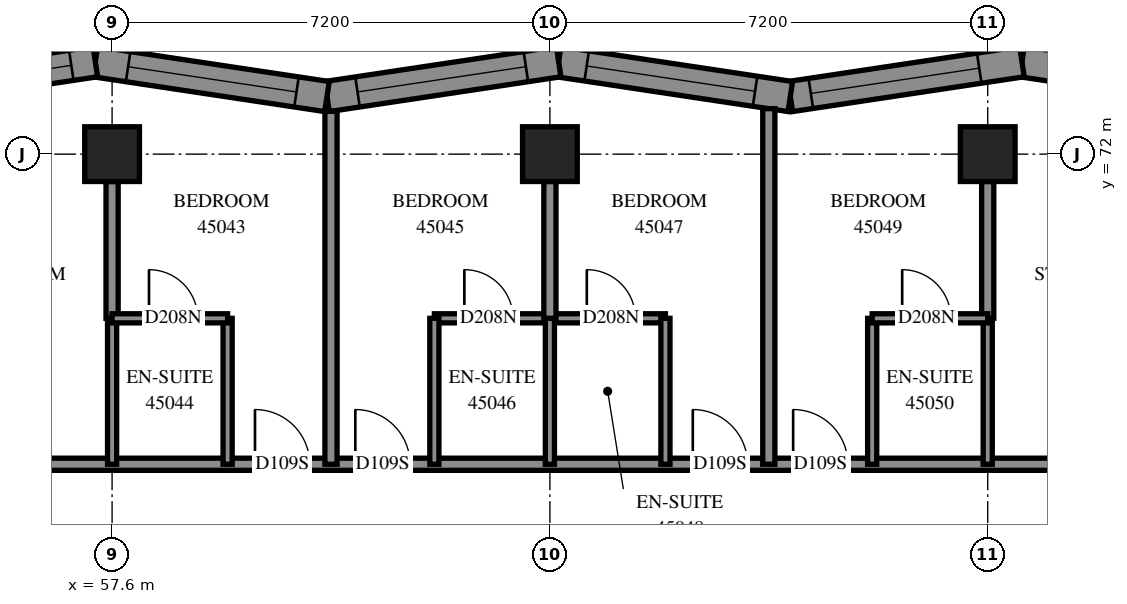
"""IFC4 building model, lengths in metres.
Left out: names, types, materials, properties, quantities, classifications, styles, units other than length and angle.
Written with IfcOpenShell. Run it as: python <this file> out.ifc"""

import sys

from ifc_helpers import new_model, si_unit, direction, frame, frame_2d, origin, origin_2d, place, context, subcontext, project, spatial, polyline, rectangle, outline, extrude, element, fill, save


model = new_model("IFC4")
c1 = context("Model", 3, precision=1e-05, world=origin(), true_north=direction((0.0, 1.0)))
c2 = subcontext(c1, "Body", "Model", "MODEL_VIEW")
j1 = project(units=[si_unit("LENGTHUNIT", "METRE"), si_unit("PLANEANGLEUNIT", "RADIAN")], contexts=[c1])
p1 = place(None, origin())
s1 = spatial("IfcSite", under=j1, at=p1, CompositionType="ELEMENT")
p2 = place(p1, origin())
s2 = spatial("IfcBuilding", under=s1, at=p2, CompositionType="ELEMENT")
p3 = place(p2, frame((0.0, 0.0, 166.0)))
s3 = spatial("IfcBuildingStorey", under=s2, at=p3, CompositionType="ELEMENT", Elevation=166.0)
for number, where, z_axis, x_axis in (
    (1, (57.6, 72.0, 0.0), (0.0, 0.0, 1.0), (1.0, 0.0, 0.0)),
    (2, (64.8, 72.0, 0.0), (0.0, 0.0, 1.0), (1.0, 0.0, 0.0)),
    (3, (72.0, 72.0, 0.0), (0.0, 0.0, 1.0), (1.0, 0.0, 0.0)),
):
    element("IfcColumn", number, at=place(p3, frame(where, z_axis=z_axis, x_axis=x_axis)), inside=s3, PredefinedType="COLUMN", context=c2, shape_type="SweptSolid", body=[
        extrude(rectangle(XDim=0.9, YDim=0.9, at=origin_2d()), origin(), (0.0, 0.0, 1.0), 3.1),
    ])
p4 = place(p3, frame((76.392, 72.944, 0.0), z_axis=(0.0, 0.0, 1.0), x_axis=(-0.9889143658, 0.1484869591, 0.0)))
e4 = element("IfcWall", 4, at=p4, inside=s3, PredefinedType="SOLIDWALL", context=c2, shape_type="SweptSolid", body=[
    extrude(outline(polyline([(0.057, -0.25), (3.909, -0.25), (3.834, 0.25), (-0.057, 0.25), (0.057, -0.25)])), origin(), (0.0, 0.0, 1.0), 3.1),
])
p5 = place(p4, frame((1.617, 0.0, 0.45)))
e5 = element("IfcOpeningElement", 5, at=p5, cuts=e4, PredefinedType="OPENING", context=c2, shape_type="SweptSolid", body=[
    extrude(rectangle(XDim=1.2, YDim=2.5, at=frame_2d((0.6, 1.25))), frame((0.0, 0.26, 0.0), z_axis=(0.0, -1.0, 0.0), x_axis=(1.0, 0.0, 0.0)), (0.0, 0.0, 1.0), 0.52),
])
p6 = place(p3, frame((72.563, 73.519, 0.0), z_axis=(0.0, 0.0, 1.0), x_axis=(-0.9889150173, -0.1484826202, 0.0)))
e6 = element("IfcWall", 6, at=p6, inside=s3, PredefinedType="SOLIDWALL", context=c2, shape_type="SweptSolid", body=[
    extrude(outline(polyline([(-0.037, -0.25), (3.815, -0.25), (3.89, 0.25), (0.037, 0.25), (-0.037, -0.25)])), origin(), (0.0, 0.0, 1.0), 3.1),
])
p7 = place(p6, frame((0.711, 0.0, 0.45)))
e7 = element("IfcOpeningElement", 7, at=p7, cuts=e6, PredefinedType="OPENING", context=c2, shape_type="SweptSolid", body=[
    extrude(rectangle(XDim=2.8, YDim=2.5, at=frame_2d((1.4, 1.25))), frame((0.0, 0.26, 0.0), z_axis=(0.0, -1.0, 0.0), x_axis=(1.0, 0.0, 0.0)), (0.0, 0.0, 1.0), 0.52),
])
p8 = place(p3, frame((68.754, 72.947, 0.0), z_axis=(0.0, 0.0, 1.0), x_axis=(-0.9889155896, 0.1484788086, 0.0)))
e8 = element("IfcWall", 8, at=p8, inside=s3, PredefinedType="SOLIDWALL", context=c2, shape_type="SweptSolid", body=[
    extrude(outline(polyline([(0.037, -0.25), (3.89, -0.25), (3.815, 0.25), (-0.037, 0.25), (0.037, -0.25)])), origin(), (0.0, 0.0, 1.0), 3.1),
])
p9 = place(p8, frame((0.586, 0.0, 0.45)))
e9 = element("IfcOpeningElement", 9, at=p9, cuts=e8, PredefinedType="OPENING", context=c2, shape_type="SweptSolid", body=[
    extrude(rectangle(XDim=2.8, YDim=2.5, at=frame_2d((1.4, 1.25))), frame((0.0, 0.26, 0.0), z_axis=(0.0, -1.0, 0.0), x_axis=(1.0, 0.0, 0.0)), (0.0, 0.0, 1.0), 0.52),
])
p10 = place(p3, frame((64.944, 73.519, 0.0), z_axis=(0.0, 0.0, 1.0), x_axis=(-0.9889150173, -0.1484826202, 0.0)))
e10 = element("IfcWall", 10, at=p10, inside=s3, PredefinedType="SOLIDWALL", context=c2, shape_type="SweptSolid", body=[
    extrude(outline(polyline([(-0.037, -0.25), (3.815, -0.25), (3.89, 0.25), (0.037, 0.25), (-0.037, -0.25)])), origin(), (0.0, 0.0, 1.0), 3.1),
])
p11 = place(p10, frame((0.545, 0.0, 0.45)))
e11 = element("IfcOpeningElement", 11, at=p11, cuts=e10, PredefinedType="OPENING", context=c2, shape_type="SweptSolid", body=[
    extrude(rectangle(XDim=2.8, YDim=2.5, at=frame_2d((1.4, 1.25))), frame((0.0, 0.26, 0.0), z_axis=(0.0, -1.0, 0.0), x_axis=(1.0, 0.0, 0.0)), (0.0, 0.0, 1.0), 0.52),
])
p12 = place(p3, frame((61.134, 72.947, 0.0), z_axis=(0.0, 0.0, 1.0), x_axis=(-0.9889155896, 0.1484788086, 0.0)))
e12 = element("IfcWall", 12, at=p12, inside=s3, PredefinedType="SOLIDWALL", context=c2, shape_type="SweptSolid", body=[
    extrude(outline(polyline([(0.037, -0.25), (3.89, -0.25), (3.815, 0.25), (-0.037, 0.25), (0.037, -0.25)])), origin(), (0.0, 0.0, 1.0), 3.1),
])
p13 = place(p12, frame((0.507, 0.0, 0.45)))
e13 = element("IfcOpeningElement", 13, at=p13, cuts=e12, PredefinedType="OPENING", context=c2, shape_type="SweptSolid", body=[
    extrude(rectangle(XDim=2.8, YDim=2.5, at=frame_2d((1.4, 1.25))), frame((0.0, 0.26, 0.0), z_axis=(0.0, -1.0, 0.0), x_axis=(1.0, 0.0, 0.0)), (0.0, 0.0, 1.0), 0.52),
])
p14 = place(p3, frame((57.325, 73.519, 0.0), z_axis=(0.0, 0.0, 1.0), x_axis=(-0.9889155896, -0.1484788086, 0.0)))
e14 = element("IfcWall", 14, at=p14, inside=s3, PredefinedType="SOLIDWALL", context=c2, shape_type="SweptSolid", body=[
    extrude(outline(polyline([(-0.037, -0.25), (3.815, -0.25), (3.89, 0.25), (0.037, 0.25), (-0.037, -0.25)])), origin(), (0.0, 0.0, 1.0), 3.1),
])
p15 = place(p14, frame((0.4, 0.0, 0.45)))
e15 = element("IfcOpeningElement", 15, at=p15, cuts=e14, PredefinedType="OPENING", context=c2, shape_type="SweptSolid", body=[
    extrude(rectangle(XDim=2.8, YDim=2.5, at=frame_2d((1.4, 1.25))), frame((0.0, 0.26, 0.0), z_axis=(0.0, -1.0, 0.0), x_axis=(1.0, 0.0, 0.0)), (0.0, 0.0, 1.0), 0.52),
])
p16 = place(p3, frame((55.5, 66.9, 0.0), z_axis=(0.0, 0.0, 1.0), x_axis=(1.0, 0.0, 0.0)))
e16 = element("IfcWall", 16, at=p16, inside=s3, PredefinedType="PARTITIONING", context=c2, shape_type="SweptSolid", body=[
    extrude(rectangle(XDim=18.6, YDim=0.2, at=frame_2d((9.3, 0.0))), origin(), (0.0, 0.0, 1.0), 3.1),
])
p17 = place(p16, frame((4.45, 0.0, 0.0)))
e17 = element("IfcOpeningElement", 17, at=p17, cuts=e16, PredefinedType="OPENING", context=c2, shape_type="SweptSolid", body=[
    extrude(rectangle(XDim=0.9, YDim=2.1, at=frame_2d((0.45, 1.05))), frame((0.0, 0.11, 0.0), z_axis=(0.0, -1.0, 0.0), x_axis=(1.0, 0.0, 0.0)), (0.0, 0.0, 1.0), 0.22),
])
p18 = place(p16, frame((6.1, 0.0, 0.0)))
e18 = element("IfcOpeningElement", 18, at=p18, cuts=e16, PredefinedType="OPENING", context=c2, shape_type="SweptSolid", body=[
    extrude(rectangle(XDim=0.9, YDim=2.1, at=frame_2d((0.45, 1.05))), frame((0.0, 0.11, 0.0), z_axis=(0.0, -1.0, 0.0), x_axis=(1.0, 0.0, 0.0)), (0.0, 0.0, 1.0), 0.22),
])
p19 = place(p16, frame((11.65, 0.0, 0.0)))
e19 = element("IfcOpeningElement", 19, at=p19, cuts=e16, PredefinedType="OPENING", context=c2, shape_type="SweptSolid", body=[
    extrude(rectangle(XDim=0.9, YDim=2.1, at=frame_2d((0.45, 1.05))), frame((0.0, 0.11, 0.0), z_axis=(0.0, -1.0, 0.0), x_axis=(1.0, 0.0, 0.0)), (0.0, 0.0, 1.0), 0.22),
])
p20 = place(p16, frame((13.3, 0.0, 0.0)))
e20 = element("IfcOpeningElement", 20, at=p20, cuts=e16, PredefinedType="OPENING", context=c2, shape_type="SweptSolid", body=[
    extrude(rectangle(XDim=0.9, YDim=2.1, at=frame_2d((0.45, 1.05))), frame((0.0, 0.11, 0.0), z_axis=(0.0, -1.0, 0.0), x_axis=(1.0, 0.0, 0.0)), (0.0, 0.0, 1.0), 0.22),
])
p21 = place(p3, frame((68.4, 66.9, 0.0), z_axis=(0.0, 0.0, 1.0), x_axis=(0.0, 1.0, 0.0)))
e21 = element("IfcWall", 21, at=p21, inside=s3, PredefinedType="PARTITIONING", context=c2, shape_type="SweptSolid", body=[
    extrude(rectangle(XDim=5.848, YDim=0.2, at=frame_2d((2.924, 0.0))), origin(), (0.0, 0.0, 1.0), 3.1),
])
p22 = place(p3, frame((61.2, 66.9, 0.0), z_axis=(0.0, 0.0, 1.0), x_axis=(0.0, 1.0, 0.0)))
e22 = element("IfcWall", 22, at=p22, inside=s3, PredefinedType="PARTITIONING", context=c2, shape_type="SweptSolid", body=[
    extrude(rectangle(XDim=5.804, YDim=0.2, at=frame_2d((2.902, 0.0))), origin(), (0.0, 0.0, 1.0), 3.1),
])
p23 = place(p3, frame((62.9, 69.3, 0.0), z_axis=(0.0, 0.0, 1.0), x_axis=(1.0, 0.0, 0.0)))
e23 = element("IfcWall", 23, at=p23, inside=s3, PredefinedType="PARTITIONING", context=c2, shape_type="SweptSolid", body=[
    extrude(rectangle(XDim=3.8, YDim=0.15, at=frame_2d((1.9, 0.0))), origin(), (0.0, 0.0, 1.0), 3.1),
])
p24 = place(p23, frame((0.493, 0.0, 0.0)))
e24 = element("IfcOpeningElement", 24, at=p24, cuts=e23, PredefinedType="OPENING", context=c2, shape_type="SweptSolid", body=[
    extrude(rectangle(XDim=0.8, YDim=2.1, at=frame_2d((0.4, 1.05))), frame((0.0, 0.085, 0.0), z_axis=(0.0, -1.0, 0.0), x_axis=(1.0, 0.0, 0.0)), (0.0, 0.0, 1.0), 0.17),
])
p25 = place(p23, frame((2.507, 0.0, 0.0)))
e25 = element("IfcOpeningElement", 25, at=p25, cuts=e23, PredefinedType="OPENING", context=c2, shape_type="SweptSolid", body=[
    extrude(rectangle(XDim=0.8, YDim=2.1, at=frame_2d((0.4, 1.05))), frame((0.0, 0.085, 0.0), z_axis=(0.0, -1.0, 0.0), x_axis=(1.0, 0.0, 0.0)), (0.0, 0.0, 1.0), 0.17),
])
for number, where, z_axis, x_axis in (
    (26, (57.6, 66.9, 0.0), (0.0, 0.0, 1.0), (0.0, 1.0, 0.0)),
    (27, (59.5, 66.9, 0.0), (0.0, 0.0, 1.0), (0.0, 1.0, 0.0)),
    (28, (62.9, 66.9, 0.0), (0.0, 0.0, 1.0), (0.0, 1.0, 0.0)),
    (29, (64.8, 66.9, 0.0), (0.0, 0.0, 1.0), (0.0, 1.0, 0.0)),
    (30, (66.7, 66.9, 0.0), (0.0, 0.0, 1.0), (0.0, 1.0, 0.0)),
    (31, (70.1, 66.9, 0.0), (0.0, 0.0, 1.0), (0.0, 1.0, 0.0)),
    (32, (72.0, 66.9, 0.0), (0.0, 0.0, 1.0), (0.0, 1.0, 0.0)),
):
    element("IfcWall", number, at=place(p3, frame(where, z_axis=z_axis, x_axis=x_axis)), inside=s3, PredefinedType="PARTITIONING", context=c2, shape_type="SweptSolid", body=[
        extrude(rectangle(XDim=2.4, YDim=0.15, at=frame_2d((1.2, 0.0))), origin(), (0.0, 0.0, 1.0), 3.1),
    ])
for number, where, z_axis, x_axis in (
    (33, (57.6, 69.3, 0.0), (0.0, 0.0, 1.0), (0.0, 1.0, 0.0)),
    (34, (64.8, 69.3, 0.0), (0.0, 0.0, 1.0), (0.0, 1.0, 0.0)),
    (35, (72.0, 69.3, 0.0), (0.0, 0.0, 1.0), (0.0, 1.0, 0.0)),
):
    element("IfcWall", number, at=place(p3, frame(where, z_axis=z_axis, x_axis=x_axis)), inside=s3, PredefinedType="PARTITIONING", context=c2, shape_type="SweptSolid", body=[
        extrude(rectangle(XDim=2.25, YDim=0.2, at=frame_2d((1.125, 0.0))), origin(), (0.0, 0.0, 1.0), 3.1),
    ])
p26 = place(p3, frame((70.1, 69.3, 0.0), z_axis=(0.0, 0.0, 1.0), x_axis=(1.0, 0.0, 0.0)))
e36 = element("IfcWall", 36, at=p26, inside=s3, PredefinedType="PARTITIONING", context=c2, shape_type="SweptSolid", body=[
    extrude(rectangle(XDim=1.9, YDim=0.15, at=frame_2d((0.95, 0.0))), origin(), (0.0, 0.0, 1.0), 3.1),
])
p27 = place(p26, frame((0.493, 0.0, 0.0)))
e37 = element("IfcOpeningElement", 37, at=p27, cuts=e36, PredefinedType="OPENING", context=c2, shape_type="SweptSolid", body=[
    extrude(rectangle(XDim=0.8, YDim=2.1, at=frame_2d((0.4, 1.05))), frame((0.0, 0.085, 0.0), z_axis=(0.0, -1.0, 0.0), x_axis=(1.0, 0.0, 0.0)), (0.0, 0.0, 1.0), 0.17),
])
p28 = place(p3, frame((57.6, 69.3, 0.0), z_axis=(0.0, 0.0, 1.0), x_axis=(1.0, 0.0, 0.0)))
e38 = element("IfcWall", 38, at=p28, inside=s3, PredefinedType="PARTITIONING", context=c2, shape_type="SweptSolid", body=[
    extrude(rectangle(XDim=1.9, YDim=0.15, at=frame_2d((0.95, 0.0))), origin(), (0.0, 0.0, 1.0), 3.1),
])
p29 = place(p28, frame((0.607, 0.0, 0.0)))
e39 = element("IfcOpeningElement", 39, at=p29, cuts=e38, PredefinedType="OPENING", context=c2, shape_type="SweptSolid", body=[
    extrude(rectangle(XDim=0.8, YDim=2.1, at=frame_2d((0.4, 1.05))), frame((0.0, 0.085, 0.0), z_axis=(0.0, -1.0, 0.0), x_axis=(1.0, 0.0, 0.0)), (0.0, 0.0, 1.0), 0.17),
])
p30 = place(p7, origin())
e40 = element("IfcWindow", 40, at=p30, inside=s3, PartitioningType="SINGLE_PANEL", PredefinedType="WINDOW", context=c2, shape_type="SweptSolid", body=[
    extrude(rectangle(XDim=2.8, YDim=2.5, at=frame_2d((1.4, 1.25))), frame((0.0, 0.18, 0.0), z_axis=(0.0, -1.0, 0.0), x_axis=(1.0, 0.0, 0.0)), (0.0, 0.0, 1.0), 0.06),
])
fill(e7, e40)
p31 = place(p9, origin())
e41 = element("IfcWindow", 41, at=p31, inside=s3, PartitioningType="SINGLE_PANEL", PredefinedType="WINDOW", context=c2, shape_type="SweptSolid", body=[
    extrude(rectangle(XDim=2.8, YDim=2.5, at=frame_2d((1.4, 1.25))), frame((0.0, 0.18, 0.0), z_axis=(0.0, -1.0, 0.0), x_axis=(1.0, 0.0, 0.0)), (0.0, 0.0, 1.0), 0.06),
])
fill(e9, e41)
p32 = place(p11, origin())
e42 = element("IfcWindow", 42, at=p32, inside=s3, PartitioningType="SINGLE_PANEL", PredefinedType="WINDOW", context=c2, shape_type="SweptSolid", body=[
    extrude(rectangle(XDim=2.8, YDim=2.5, at=frame_2d((1.4, 1.25))), frame((0.0, 0.18, 0.0), z_axis=(0.0, -1.0, 0.0), x_axis=(1.0, 0.0, 0.0)), (0.0, 0.0, 1.0), 0.06),
])
fill(e11, e42)
p33 = place(p13, origin())
e43 = element("IfcWindow", 43, at=p33, inside=s3, PartitioningType="SINGLE_PANEL", PredefinedType="WINDOW", context=c2, shape_type="SweptSolid", body=[
    extrude(rectangle(XDim=2.8, YDim=2.5, at=frame_2d((1.4, 1.25))), frame((0.0, 0.18, 0.0), z_axis=(0.0, -1.0, 0.0), x_axis=(1.0, 0.0, 0.0)), (0.0, 0.0, 1.0), 0.06),
])
fill(e13, e43)
p34 = place(p15, origin())
e44 = element("IfcWindow", 44, at=p34, inside=s3, PartitioningType="SINGLE_PANEL", PredefinedType="WINDOW", context=c2, shape_type="SweptSolid", body=[
    extrude(rectangle(XDim=2.8, YDim=2.5, at=frame_2d((1.4, 1.25))), frame((0.0, 0.18, 0.0), z_axis=(0.0, -1.0, 0.0), x_axis=(1.0, 0.0, 0.0)), (0.0, 0.0, 1.0), 0.06),
])
fill(e15, e44)
p35 = place(p17, origin())
e45 = element("IfcDoor", 45, at=p35, inside=s3, OperationType="SINGLE_SWING_RIGHT", PredefinedType="DOOR", context=c2, shape_type="SweptSolid", body=[
    extrude(rectangle(XDim=0.9, YDim=2.1, at=frame_2d((0.45, 1.05))), frame((0.0, 0.025, 0.0), z_axis=(0.0, -1.0, 0.0), x_axis=(1.0, 0.0, 0.0)), (0.0, 0.0, 1.0), 0.05),
])
fill(e17, e45)
p36 = place(p29, origin())
e46 = element("IfcDoor", 46, at=p36, inside=s3, OperationType="SINGLE_SWING_RIGHT", PredefinedType="DOOR", context=c2, shape_type="SweptSolid", body=[
    extrude(rectangle(XDim=0.8, YDim=2.1, at=frame_2d((0.4, 1.05))), frame((0.0, 0.025, 0.0), z_axis=(0.0, -1.0, 0.0), x_axis=(1.0, 0.0, 0.0)), (0.0, 0.0, 1.0), 0.05),
])
fill(e39, e46)
p37 = place(p18, origin())
e47 = element("IfcDoor", 47, at=p37, inside=s3, OperationType="SINGLE_SWING_LEFT", PredefinedType="DOOR", context=c2, shape_type="SweptSolid", body=[
    extrude(rectangle(XDim=0.9, YDim=2.1, at=frame_2d((0.45, 1.05))), frame((0.0, 0.025, 0.0), z_axis=(0.0, -1.0, 0.0), x_axis=(1.0, 0.0, 0.0)), (0.0, 0.0, 1.0), 0.05),
])
fill(e18, e47)
p38 = place(p24, origin())
e48 = element("IfcDoor", 48, at=p38, inside=s3, OperationType="SINGLE_SWING_RIGHT", PredefinedType="DOOR", context=c2, shape_type="SweptSolid", body=[
    extrude(rectangle(XDim=0.8, YDim=2.1, at=frame_2d((0.4, 1.05))), frame((0.0, 0.025, 0.0), z_axis=(0.0, -1.0, 0.0), x_axis=(1.0, 0.0, 0.0)), (0.0, 0.0, 1.0), 0.05),
])
fill(e24, e48)
p39 = place(p19, origin())
e49 = element("IfcDoor", 49, at=p39, inside=s3, OperationType="SINGLE_SWING_RIGHT", PredefinedType="DOOR", context=c2, shape_type="SweptSolid", body=[
    extrude(rectangle(XDim=0.9, YDim=2.1, at=frame_2d((0.45, 1.05))), frame((0.0, 0.025, 0.0), z_axis=(0.0, -1.0, 0.0), x_axis=(1.0, 0.0, 0.0)), (0.0, 0.0, 1.0), 0.05),
])
fill(e19, e49)
p40 = place(p25, origin())
e50 = element("IfcDoor", 50, at=p40, inside=s3, OperationType="SINGLE_SWING_RIGHT", PredefinedType="DOOR", context=c2, shape_type="SweptSolid", body=[
    extrude(rectangle(XDim=0.8, YDim=2.1, at=frame_2d((0.4, 1.05))), frame((0.0, 0.025, 0.0), z_axis=(0.0, -1.0, 0.0), x_axis=(1.0, 0.0, 0.0)), (0.0, 0.0, 1.0), 0.05),
])
fill(e25, e50)
p41 = place(p20, origin())
e51 = element("IfcDoor", 51, at=p41, inside=s3, OperationType="SINGLE_SWING_LEFT", PredefinedType="DOOR", context=c2, shape_type="SweptSolid", body=[
    extrude(rectangle(XDim=0.9, YDim=2.1, at=frame_2d((0.45, 1.05))), frame((0.0, 0.025, 0.0), z_axis=(0.0, -1.0, 0.0), x_axis=(1.0, 0.0, 0.0)), (0.0, 0.0, 1.0), 0.05),
])
fill(e20, e51)
p42 = place(p27, origin())
e52 = element("IfcDoor", 52, at=p42, inside=s3, OperationType="SINGLE_SWING_RIGHT", PredefinedType="DOOR", context=c2, shape_type="SweptSolid", body=[
    extrude(rectangle(XDim=0.8, YDim=2.1, at=frame_2d((0.4, 1.05))), frame((0.0, 0.025, 0.0), z_axis=(0.0, -1.0, 0.0), x_axis=(1.0, 0.0, 0.0)), (0.0, 0.0, 1.0), 0.05),
])
fill(e37, e52)
save(model, sys.argv[1])
